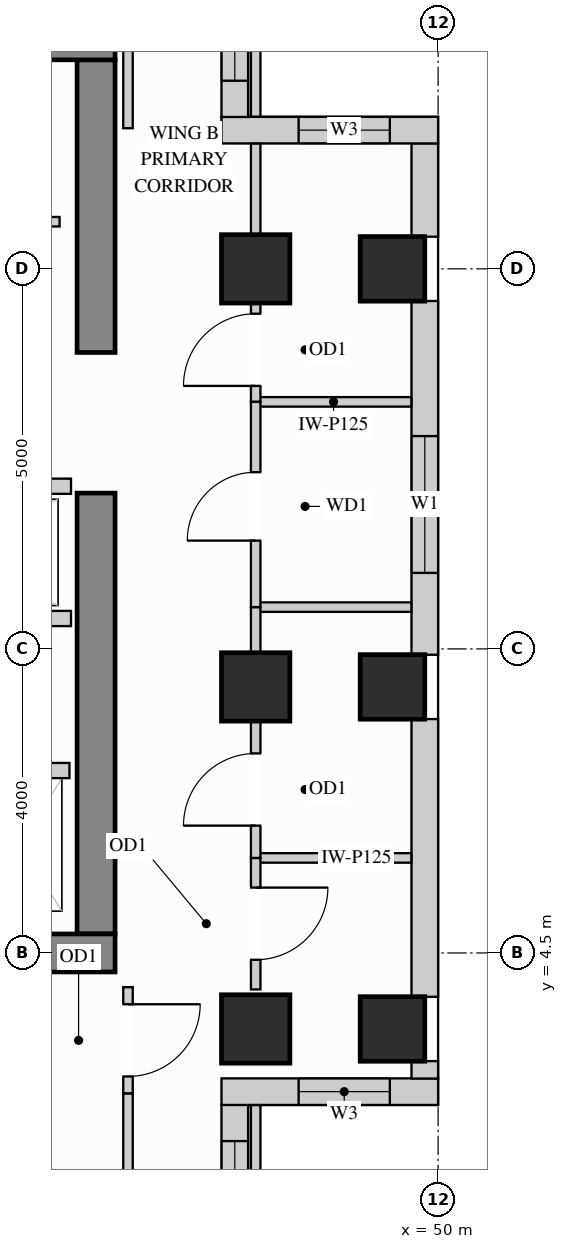
"""IFC4 building model, lengths in metres.
Left out: names, types, materials, properties, quantities, classifications, styles, units other than length and angle.
Written with IfcOpenShell. Run it as: python <this file> out.ifc"""

import sys

from ifc_helpers import new_model, si_unit, direction, frame, frame_2d, origin, origin_2d, place, context, subcontext, project, spatial, rectangle, extrude, source, transform, mapped, element, fill, save


model = new_model("IFC4")
c1 = context("Model", 3, precision=1e-05, world=origin(), true_north=direction((0.0, 1.0)))
c2 = subcontext(c1, "Body", "Model", "MODEL_VIEW")
j1 = project(units=[si_unit("LENGTHUNIT", "METRE"), si_unit("PLANEANGLEUNIT", "RADIAN")], contexts=[c1])
p1 = place(None, origin())
s1 = spatial("IfcSite", under=j1, at=p1, CompositionType="ELEMENT")
p2 = place(p1, origin())
s2 = spatial("IfcBuilding", under=s1, at=p2, CompositionType="ELEMENT")
p3 = place(p2, frame((0.0, 0.0, 216.0)))
s3 = spatial("IfcBuildingStorey", under=s2, at=p3, CompositionType="ELEMENT", Elevation=216.0)
m1 = source(origin(), c2, "Body", "SweptSolid", [
    extrude(rectangle(XDim=0.9, YDim=0.9, at=origin_2d()), origin(), (0.0, 0.0, 1.0), 3.4),
])
for number, where, z_axis, x_axis in (
    (1, (47.6, 13.5, 0.0), (0.0, 0.0, 1.0), (1.0, 0.0, 0.0)),
    (2, (47.6, 3.5, 0.0), (0.0, 0.0, 1.0), (1.0, 0.0, 0.0)),
    (3, (47.6, 8.0, 0.0), (0.0, 0.0, 1.0), (1.0, 0.0, 0.0)),
):
    element("IfcColumn", number, at=place(p3, frame(where, z_axis=z_axis, x_axis=x_axis)), inside=s3, PredefinedType="COLUMN", context=c2, shape_type="MappedRepresentation", body=[
        mapped(m1, transform((0.0, 0.0, 0.0), x_axis=(1.0, 0.0, 0.0), y_axis=(0.0, 1.0, 0.0), z_axis=(0.0, 0.0, 1.0))),
    ])
m2 = source(origin(), c2, "Body", "SweptSolid", [
    extrude(rectangle(XDim=0.85, YDim=0.85, at=origin_2d()), origin(), (0.0, 0.0, 1.0), 3.4),
])
for number, where, z_axis, x_axis in (
    (4, (49.4, 13.5, 0.0), (0.0, 0.0, 1.0), (1.0, 0.0, 0.0)),
    (5, (49.4, 3.5, 0.0), (0.0, 0.0, 1.0), (1.0, 0.0, 0.0)),
    (6, (49.4, 8.0, 0.0), (0.0, 0.0, 1.0), (1.0, 0.0, 0.0)),
):
    element("IfcColumn", number, at=place(p3, frame(where, z_axis=z_axis, x_axis=x_axis)), inside=s3, PredefinedType="COLUMN", context=c2, shape_type="MappedRepresentation", body=[
        mapped(m2, transform((0.0, 0.0, 0.0), x_axis=(1.0, 0.0, 0.0), y_axis=(0.0, 1.0, 0.0), z_axis=(0.0, 0.0, 1.0))),
    ])
m3 = source(origin(), c2, "Body", "SweptSolid", [
    extrude(rectangle(XDim=5.8, YDim=0.5, at=frame_2d((2.9, 0.0))), origin(), (0.0, 0.0, 1.0), 3.4),
])
p4 = place(p3, frame((45.5, 4.75, 0.0), z_axis=(0.0, 0.0, 1.0), x_axis=(0.0, 1.0, 0.0)))
e7 = element("IfcWall", 7, at=p4, inside=s3, PredefinedType="SHEAR", context=c2, shape_type="MappedRepresentation", body=[
    mapped(m3, transform((0.0, 0.0, 0.0), x_axis=(1.0, 0.0, 0.0), y_axis=(0.0, 1.0, 0.0), z_axis=(0.0, 0.0, 1.0))),
])
m4 = source(origin(), c2, "Body", "SweptSolid", [
    extrude(rectangle(XDim=3.85, YDim=0.5, at=frame_2d((1.925, 0.0))), origin(), (0.0, 0.0, 1.0), 3.4),
])
p5 = place(p3, frame((45.5, 12.4, 0.0), z_axis=(0.0, 0.0, 1.0), x_axis=(0.0, 1.0, 0.0)))
e8 = element("IfcWall", 8, at=p5, inside=s3, PredefinedType="SHEAR", context=c2, shape_type="MappedRepresentation", body=[
    mapped(m4, transform((0.0, 0.0, 0.0), x_axis=(1.0, 0.0, 0.0), y_axis=(0.0, 1.0, 0.0), z_axis=(0.0, 0.0, 1.0))),
])
m5 = source(origin(), c2, "Body", "SweptSolid", [
    extrude(rectangle(XDim=10.0, YDim=0.5, at=frame_2d((5.0, 0.0))), origin(), (0.0, 0.0, 1.0), 3.4),
])
for number, where, z_axis, x_axis in (
    (9, (35.75, 16.5, 0.0), (0.0, 0.0, 1.0), (1.0, 0.0, 0.0)),
    (10, (35.75, 4.5, 0.0), (0.0, 0.0, 1.0), (1.0, 0.0, 0.0)),
):
    element("IfcWall", number, at=place(p3, frame(where, z_axis=z_axis, x_axis=x_axis)), inside=s3, PredefinedType="SHEAR", context=c2, shape_type="MappedRepresentation", body=[
        mapped(m5, transform((0.0, 0.0, 0.0), x_axis=(1.0, 0.0, 0.0), y_axis=(0.0, 1.0, 0.0), z_axis=(0.0, 0.0, 1.0))),
    ])
p6 = place(p3, frame((47.325, 0.348, 0.0), z_axis=(0.0, 0.0, 1.0), x_axis=(0.0, 1.0, 0.0)))
e11 = element("IfcWall", 11, at=p6, inside=s3, PredefinedType="SOLIDWALL", context=c2, shape_type="SweptSolid", body=[
    extrude(rectangle(XDim=2.154, YDim=0.35, at=frame_2d((1.077, 0.0))), origin(), (0.0, 0.0, 1.0), 3.385),
])
p7 = place(p6, frame((0.477, 0.0, 0.78)))
e12 = element("IfcOpeningElement", 12, at=p7, cuts=e11, PredefinedType="OPENING", context=c2, shape_type="SweptSolid", body=[
    extrude(rectangle(XDim=1.2, YDim=2.1, at=frame_2d((0.6, 1.05))), frame((0.0, 0.185, 0.0), z_axis=(0.0, -1.0, 0.0), x_axis=(1.0, 0.0, 0.0)), (0.0, 0.0, 1.0), 0.37),
])
p8 = place(p3, frame((47.15, 2.675, 0.0), z_axis=(0.0, 0.0, 1.0), x_axis=(1.0, 0.0, 0.0)))
e13 = element("IfcWall", 13, at=p8, inside=s3, PredefinedType="SOLIDWALL", context=c2, shape_type="SweptSolid", body=[
    extrude(rectangle(XDim=2.85, YDim=0.35, at=frame_2d((1.425, 0.0))), origin(), (0.0, 0.0, 1.0), 3.385),
])
p9 = place(p8, frame((1.015, 0.0, 0.78)))
e14 = element("IfcOpeningElement", 14, at=p9, cuts=e13, PredefinedType="OPENING", context=c2, shape_type="SweptSolid", body=[
    extrude(rectangle(XDim=1.2, YDim=2.1, at=frame_2d((0.6, 1.05))), frame((0.0, 0.185, 0.0), z_axis=(0.0, -1.0, 0.0), x_axis=(1.0, 0.0, 0.0)), (0.0, 0.0, 1.0), 0.37),
])
m6 = source(origin(), c2, "Body", "SweptSolid", [
    extrude(rectangle(XDim=0.229, YDim=0.35, at=frame_2d((0.115, 0.0))), origin(), (0.0, 0.0, 1.0), 3.385),
])
p10 = place(p3, frame((49.825, 2.848, 0.0), z_axis=(0.0, 0.0, 1.0), x_axis=(0.0, 1.0, 0.0)))
e15 = element("IfcWall", 15, at=p10, inside=s3, PredefinedType="SOLIDWALL", context=c2, shape_type="MappedRepresentation", body=[
    mapped(m6, transform((0.0, 0.0, 0.0), x_axis=(1.0, 0.0, 0.0), y_axis=(0.0, 1.0, 0.0), z_axis=(0.0, 0.0, 1.0))),
])
m7 = source(origin(), c2, "Body", "SweptSolid", [
    extrude(rectangle(XDim=3.654, YDim=0.35, at=frame_2d((1.827, 0.0))), origin(), (0.0, 0.0, 1.0), 3.385),
])
p11 = place(p3, frame((49.825, 3.923, 0.0), z_axis=(0.0, 0.0, 1.0), x_axis=(0.0, 1.0, 0.0)))
e16 = element("IfcWall", 16, at=p11, inside=s3, PredefinedType="SOLIDWALL", context=c2, shape_type="MappedRepresentation", body=[
    mapped(m7, transform((0.0, 0.0, 0.0), x_axis=(1.0, 0.0, 0.0), y_axis=(0.0, 1.0, 0.0), z_axis=(0.0, 0.0, 1.0))),
])
p12 = place(p3, frame((49.825, 8.423, 0.0), z_axis=(0.0, 0.0, 1.0), x_axis=(0.0, 1.0, 0.0)))
e17 = element("IfcWall", 17, at=p12, inside=s3, PredefinedType="SOLIDWALL", context=c2, shape_type="SweptSolid", body=[
    extrude(rectangle(XDim=4.654, YDim=0.35, at=frame_2d((2.327, 0.0))), origin(), (0.0, 0.0, 1.0), 3.385),
])
p13 = place(p12, frame((1.077, 0.0, 0.78)))
e18 = element("IfcOpeningElement", 18, at=p13, cuts=e17, PredefinedType="OPENING", context=c2, shape_type="SweptSolid", body=[
    extrude(rectangle(XDim=1.8, YDim=2.1, at=frame_2d((0.9, 1.05))), frame((0.0, 0.185, 0.0), z_axis=(0.0, -1.0, 0.0), x_axis=(1.0, 0.0, 0.0)), (0.0, 0.0, 1.0), 0.37),
])
m8 = source(origin(), c2, "Body", "SweptSolid", [
    extrude(rectangle(XDim=1.229, YDim=0.35, at=frame_2d((0.615, 0.0))), origin(), (0.0, 0.0, 1.0), 3.385),
])
p14 = place(p3, frame((49.825, 13.923, 0.0), z_axis=(0.0, 0.0, 1.0), x_axis=(0.0, 1.0, 0.0)))
e19 = element("IfcWall", 19, at=p14, inside=s3, PredefinedType="SOLIDWALL", context=c2, shape_type="MappedRepresentation", body=[
    mapped(m8, transform((0.0, 0.0, 0.0), x_axis=(1.0, 0.0, 0.0), y_axis=(0.0, 1.0, 0.0), z_axis=(0.0, 0.0, 1.0))),
])
p15 = place(p3, frame((50.0, 15.325, 0.0), z_axis=(0.0, 0.0, 1.0), x_axis=(-1.0, 0.0, 0.0)))
e20 = element("IfcWall", 20, at=p15, inside=s3, PredefinedType="SOLIDWALL", context=c2, shape_type="SweptSolid", body=[
    extrude(rectangle(XDim=2.85, YDim=0.35, at=frame_2d((1.425, 0.0))), origin(), (0.0, 0.0, 1.0), 3.385),
])
p16 = place(p15, frame((0.635, 0.0, 0.78)))
e21 = element("IfcOpeningElement", 21, at=p16, cuts=e20, PredefinedType="OPENING", context=c2, shape_type="SweptSolid", body=[
    extrude(rectangle(XDim=1.2, YDim=2.1, at=frame_2d((0.6, 1.05))), frame((0.0, 0.185, 0.0), z_axis=(0.0, -1.0, 0.0), x_axis=(1.0, 0.0, 0.0)), (0.0, 0.0, 1.0), 0.37),
])
p17 = place(p3, frame((47.325, 15.498, 0.0), z_axis=(0.0, 0.0, 1.0), x_axis=(0.0, 1.0, 0.0)))
e22 = element("IfcWall", 22, at=p17, inside=s3, PredefinedType="SOLIDWALL", context=c2, shape_type="SweptSolid", body=[
    extrude(rectangle(XDim=2.154, YDim=0.35, at=frame_2d((1.077, 0.0))), origin(), (0.0, 0.0, 1.0), 3.385),
])
p18 = place(p17, frame((0.477, 0.0, 0.78)))
e23 = element("IfcOpeningElement", 23, at=p18, cuts=e22, PredefinedType="OPENING", context=c2, shape_type="SweptSolid", body=[
    extrude(rectangle(XDim=1.2, YDim=2.1, at=frame_2d((0.6, 1.05))), frame((0.0, 0.185, 0.0), z_axis=(0.0, -1.0, 0.0), x_axis=(1.0, 0.0, 0.0)), (0.0, 0.0, 1.0), 0.37),
])
p19 = place(p3, frame((40.75, 14.12, 0.0), z_axis=(0.0, 0.0, 1.0), x_axis=(1.0, 0.0, 0.0)))
e24 = element("IfcWall", 24, at=p19, inside=s3, PredefinedType="PARTITIONING", context=c2, shape_type="SweptSolid", body=[
    extrude(rectangle(XDim=4.27, YDim=0.125, at=frame_2d((2.135, 0.0))), origin(), (0.0, 0.0, 1.0), 3.385),
])
p20 = place(p19, frame((1.66, 0.0, 0.0)))
e25 = element("IfcOpeningElement", 25, at=p20, cuts=e24, PredefinedType="OPENING", context=c2, shape_type="SweptSolid", body=[
    extrude(rectangle(XDim=0.95, YDim=2.15, at=frame_2d((0.475, 1.075))), frame((0.0, 0.073, 0.0), z_axis=(0.0, -1.0, 0.0), x_axis=(1.0, 0.0, 0.0)), (0.0, 0.0, 1.0), 0.145),
])
m9 = source(origin(), c2, "Body", "SweptSolid", [
    extrude(rectangle(XDim=2.048, YDim=0.125, at=frame_2d((1.024, 0.0))), origin(), (0.0, 0.0, 1.0), 2.916),
])
p21 = place(p3, frame((47.6, 11.75, 0.0), z_axis=(0.0, 0.0, 1.0), x_axis=(1.0, 0.0, 0.0)))
e26 = element("IfcWall", 26, at=p21, inside=s3, PredefinedType="PARTITIONING", context=c2, shape_type="MappedRepresentation", body=[
    mapped(m9, transform((0.0, 0.0, 0.0), x_axis=(1.0, 0.0, 0.0), y_axis=(0.0, 1.0, 0.0), z_axis=(0.0, 0.0, 1.0))),
])
m10 = source(origin(), c2, "Body", "SweptSolid", [
    extrude(rectangle(XDim=2.048, YDim=0.125, at=frame_2d((1.024, 0.0))), origin(), (0.0, 0.0, 1.0), 3.385),
])
for number, where, z_axis, x_axis in (
    (27, (47.6, 5.75, 0.0), (0.0, 0.0, 1.0), (1.0, 0.0, 0.0)),
    (28, (47.6, 9.05, 0.0), (0.0, 0.0, 1.0), (1.0, 0.0, 0.0)),
):
    element("IfcWall", number, at=place(p3, frame(where, z_axis=z_axis, x_axis=x_axis)), inside=s3, PredefinedType="PARTITIONING", context=c2, shape_type="MappedRepresentation", body=[
        mapped(m10, transform((0.0, 0.0, 0.0), x_axis=(1.0, 0.0, 0.0), y_axis=(0.0, 1.0, 0.0), z_axis=(0.0, 0.0, 1.0))),
    ])
p22 = place(p3, frame((47.6, 4.02, 0.0), z_axis=(0.0, 0.0, 1.0), x_axis=(0.0, 1.0, 0.0)))
e29 = element("IfcWall", 29, at=p22, inside=s3, PredefinedType="PARTITIONING", context=c2, shape_type="SweptSolid", body=[
    extrude(rectangle(XDim=1.73, YDim=0.125, at=frame_2d((0.865, 0.0))), origin(), (0.0, 0.0, 1.0), 2.773),
])
p23 = place(p22, frame((0.39, 0.0, 0.0)))
e30 = element("IfcOpeningElement", 30, at=p23, cuts=e29, PredefinedType="OPENING", context=c2, shape_type="SweptSolid", body=[
    extrude(rectangle(XDim=0.95, YDim=2.15, at=frame_2d((0.475, 1.075))), frame((0.0, 0.073, 0.0), z_axis=(0.0, -1.0, 0.0), x_axis=(1.0, 0.0, 0.0)), (0.0, 0.0, 1.0), 0.145),
])
m11 = source(origin(), c2, "Body", "SweptSolid", [
    extrude(rectangle(XDim=2.148, YDim=0.125, at=frame_2d((1.074, 0.0))), origin(), (0.0, 0.0, 1.0), 3.385),
])
p24 = place(p3, frame((47.6, 0.35, 0.0), z_axis=(0.0, 0.0, 1.0), x_axis=(0.0, 1.0, 0.0)))
e31 = element("IfcWall", 31, at=p24, inside=s3, PredefinedType="PARTITIONING", context=c2, shape_type="MappedRepresentation", body=[
    mapped(m11, transform((0.0, 0.0, 0.0), x_axis=(1.0, 0.0, 0.0), y_axis=(0.0, 1.0, 0.0), z_axis=(0.0, 0.0, 1.0))),
])
p25 = place(p3, frame((47.6, 5.75, 0.0), z_axis=(0.0, 0.0, 1.0), x_axis=(0.0, 1.0, 0.0)))
e32 = element("IfcWall", 32, at=p25, inside=s3, PredefinedType="PARTITIONING", context=c2, shape_type="SweptSolid", body=[
    extrude(rectangle(XDim=1.8, YDim=0.125, at=frame_2d((0.9, 0.0))), origin(), (0.0, 0.0, 1.0), 2.773),
])
p26 = place(p25, frame((0.425, 0.0, 0.0)))
e33 = element("IfcOpeningElement", 33, at=p26, cuts=e32, PredefinedType="OPENING", context=c2, shape_type="SweptSolid", body=[
    extrude(rectangle(XDim=0.95, YDim=2.15, at=frame_2d((0.475, 1.075))), frame((0.0, 0.073, 0.0), z_axis=(0.0, -1.0, 0.0), x_axis=(1.0, 0.0, 0.0)), (0.0, 0.0, 1.0), 0.145),
])
m12 = source(origin(), c2, "Body", "SweptSolid", [
    extrude(rectangle(XDim=0.6, YDim=0.125, at=frame_2d((0.3, 0.0))), origin(), (0.0, 0.0, 1.0), 2.773),
])
p27 = place(p3, frame((47.6, 8.45, 0.0), z_axis=(0.0, 0.0, 1.0), x_axis=(0.0, 1.0, 0.0)))
e34 = element("IfcWall", 34, at=p27, inside=s3, PredefinedType="PARTITIONING", context=c2, shape_type="MappedRepresentation", body=[
    mapped(m12, transform((0.0, 0.0, 0.0), x_axis=(1.0, 0.0, 0.0), y_axis=(0.0, 1.0, 0.0), z_axis=(0.0, 0.0, 1.0))),
])
p28 = place(p3, frame((47.6, 11.75, 0.0), z_axis=(0.0, 0.0, 1.0), x_axis=(0.0, 1.0, 0.0)))
e35 = element("IfcWall", 35, at=p28, inside=s3, PredefinedType="PARTITIONING", context=c2, shape_type="SweptSolid", body=[
    extrude(rectangle(XDim=1.3, YDim=0.125, at=frame_2d((0.65, 0.0))), origin(), (0.0, 0.0, 1.0), 2.773),
])
p29 = place(p28, frame((0.21, 0.0, 0.0)))
e36 = element("IfcOpeningElement", 36, at=p29, cuts=e35, PredefinedType="OPENING", context=c2, shape_type="SweptSolid", body=[
    extrude(rectangle(XDim=0.95, YDim=2.15, at=frame_2d((0.475, 1.075))), frame((0.0, 0.073, 0.0), z_axis=(0.0, -1.0, 0.0), x_axis=(1.0, 0.0, 0.0)), (0.0, 0.0, 1.0), 0.145),
])
m13 = source(origin(), c2, "Body", "SweptSolid", [
    extrude(rectangle(XDim=1.198, YDim=0.125, at=frame_2d((0.599, 0.0))), origin(), (0.0, 0.0, 1.0), 3.385),
])
p30 = place(p3, frame((47.6, 13.95, 0.0), z_axis=(0.0, 0.0, 1.0), x_axis=(0.0, 1.0, 0.0)))
e37 = element("IfcWall", 37, at=p30, inside=s3, PredefinedType="PARTITIONING", context=c2, shape_type="MappedRepresentation", body=[
    mapped(m13, transform((0.0, 0.0, 0.0), x_axis=(1.0, 0.0, 0.0), y_axis=(0.0, 1.0, 0.0), z_axis=(0.0, 0.0, 1.0))),
])
p31 = place(p3, frame((47.6, 15.502, 0.0), z_axis=(0.0, 0.0, 1.0), x_axis=(0.0, 1.0, 0.0)))
e38 = element("IfcWall", 38, at=p31, inside=s3, PredefinedType="PARTITIONING", context=c2, shape_type="MappedRepresentation", body=[
    mapped(m11, transform((0.0, 0.0, 0.0), x_axis=(1.0, 0.0, 0.0), y_axis=(0.0, 1.0, 0.0), z_axis=(0.0, 0.0, 1.0))),
])
p32 = place(p3, frame((47.6, 9.05, 0.0), z_axis=(0.0, 0.0, 1.0), x_axis=(0.0, 1.0, 0.0)))
e39 = element("IfcWall", 39, at=p32, inside=s3, PredefinedType="PARTITIONING", context=c2, shape_type="SweptSolid", body=[
    extrude(rectangle(XDim=2.7, YDim=0.125, at=frame_2d((1.35, 0.0))), origin(), (0.0, 0.0, 1.0), 2.773),
])
p33 = place(p32, frame((0.875, 0.0, 0.0)))
e40 = element("IfcOpeningElement", 40, at=p33, cuts=e39, PredefinedType="OPENING", context=c2, shape_type="SweptSolid", body=[
    extrude(rectangle(XDim=0.9, YDim=2.15, at=frame_2d((0.45, 1.075))), frame((0.0, 0.073, 0.0), z_axis=(0.0, -1.0, 0.0), x_axis=(1.0, 0.0, 0.0)), (0.0, 0.0, 1.0), 0.145),
])
m14 = source(origin(), c2, "Body", "SweptSolid", [
    extrude(rectangle(XDim=2.298, YDim=0.125, at=frame_2d((1.149, 0.0))), origin(), (0.0, 0.0, 1.0), 3.385),
])
p34 = place(p3, frame((45.92, 15.35, 0.0), z_axis=(0.0, 0.0, 1.0), x_axis=(0.0, 1.0, 0.0)))
e41 = element("IfcWall", 41, at=p34, inside=s3, PredefinedType="PARTITIONING", context=c2, shape_type="MappedRepresentation", body=[
    mapped(m14, transform((0.0, 0.0, 0.0), x_axis=(1.0, 0.0, 0.0), y_axis=(0.0, 1.0, 0.0), z_axis=(0.0, 0.0, 1.0))),
])
p35 = place(p3, frame((45.92, 2.65, 0.0), z_axis=(0.0, 0.0, 1.0), x_axis=(0.0, 1.0, 0.0)))
e42 = element("IfcWall", 42, at=p35, inside=s3, PredefinedType="PARTITIONING", context=c2, shape_type="SweptSolid", body=[
    extrude(rectangle(XDim=1.4, YDim=0.125, at=frame_2d((0.7, 0.0))), origin(), (0.0, 0.0, 1.0), 3.385),
])
p36 = place(p35, frame((0.225, 0.0, 0.0)))
e43 = element("IfcOpeningElement", 43, at=p36, cuts=e42, PredefinedType="OPENING", context=c2, shape_type="SweptSolid", body=[
    extrude(rectangle(XDim=0.95, YDim=2.15, at=frame_2d((0.475, 1.075))), frame((0.0, 0.073, 0.0), z_axis=(0.0, -1.0, 0.0), x_axis=(1.0, 0.0, 0.0)), (0.0, 0.0, 1.0), 0.145),
])
p37 = place(p3, frame((45.92, 0.352, 0.0), z_axis=(0.0, 0.0, 1.0), x_axis=(0.0, 1.0, 0.0)))
e44 = element("IfcWall", 44, at=p37, inside=s3, PredefinedType="PARTITIONING", context=c2, shape_type="MappedRepresentation", body=[
    mapped(m14, transform((0.0, 0.0, 0.0), x_axis=(1.0, 0.0, 0.0), y_axis=(0.0, 1.0, 0.0), z_axis=(0.0, 0.0, 1.0))),
])
m15 = source(origin(), c2, "Body", "SweptSolid", [
    extrude(rectangle(XDim=1.3, YDim=0.2, at=frame_2d((0.65, 0.0))), origin(), (0.0, 0.0, 1.0), 3.385),
])
p38 = place(p3, frame((43.85, 6.9, 0.0), z_axis=(0.0, 0.0, 1.0), x_axis=(1.0, 0.0, 0.0)))
e45 = element("IfcWall", 45, at=p38, inside=s3, PredefinedType="PARTITIONING", context=c2, shape_type="MappedRepresentation", body=[
    mapped(m15, transform((0.0, 0.0, 0.0), x_axis=(1.0, 0.0, 0.0), y_axis=(0.0, 1.0, 0.0), z_axis=(0.0, 0.0, 1.0))),
])
m16 = source(origin(), c2, "Body", "SweptSolid", [
    extrude(rectangle(XDim=3.49, YDim=0.2, at=frame_2d((1.745, 0.0))), origin(), (0.0, 0.0, 1.0), 3.385),
])
for number, where, z_axis, x_axis in (
    (46, (41.68, 10.64, 0.0), (0.0, 0.0, 1.0), (1.0, 0.0, 0.0)),
    (47, (41.68, 8.9, 0.0), (0.0, 0.0, 1.0), (1.0, 0.0, 0.0)),
):
    element("IfcWall", number, at=place(p3, frame(where, z_axis=z_axis, x_axis=x_axis)), inside=s3, PredefinedType="PARTITIONING", context=c2, shape_type="MappedRepresentation", body=[
        mapped(m16, transform((0.0, 0.0, 0.0), x_axis=(1.0, 0.0, 0.0), y_axis=(0.0, 1.0, 0.0), z_axis=(0.0, 0.0, 1.0))),
    ])
m17 = source(origin(), c2, "Body", "SweptSolid", [
    extrude(rectangle(XDim=0.95, YDim=2.15, at=frame_2d((0.475, 1.075))), frame((0.0, 0.025, 0.0), z_axis=(0.0, -1.0, 0.0), x_axis=(1.0, 0.0, 0.0)), (0.0, 0.0, 1.0), 0.05),
])
p39 = place(p36, origin())
e48 = element("IfcDoor", 48, at=p39, inside=s3, OperationType="SINGLE_SWING_RIGHT", PredefinedType="DOOR", context=c2, shape_type="MappedRepresentation", body=[
    mapped(m17, transform((0.0, 0.0, 0.0), x_axis=(1.0, 0.0, 0.0), y_axis=(0.0, 1.0, 0.0), z_axis=(0.0, 0.0, 1.0))),
])
fill(e43, e48)
p40 = place(p23, origin())
e49 = element("IfcDoor", 49, at=p40, inside=s3, OperationType="SINGLE_SWING_RIGHT", PredefinedType="DOOR", context=c2, shape_type="MappedRepresentation", body=[
    mapped(m17, transform((0.0, 0.0, 0.0), x_axis=(1.0, 0.0, 0.0), y_axis=(0.0, 1.0, 0.0), z_axis=(0.0, 0.0, 1.0))),
])
fill(e30, e49)
p41 = place(p26, origin())
e50 = element("IfcDoor", 50, at=p41, inside=s3, OperationType="SINGLE_SWING_LEFT", PredefinedType="DOOR", context=c2, shape_type="MappedRepresentation", body=[
    mapped(m17, transform((0.0, 0.0, 0.0), x_axis=(1.0, 0.0, 0.0), y_axis=(0.0, 1.0, 0.0), z_axis=(0.0, 0.0, 1.0))),
])
fill(e33, e50)
p42 = place(p29, origin())
e51 = element("IfcDoor", 51, at=p42, inside=s3, OperationType="SINGLE_SWING_LEFT", PredefinedType="DOOR", context=c2, shape_type="MappedRepresentation", body=[
    mapped(m17, transform((0.0, 0.0, 0.0), x_axis=(1.0, 0.0, 0.0), y_axis=(0.0, 1.0, 0.0), z_axis=(0.0, 0.0, 1.0))),
])
fill(e36, e51)
m18 = source(origin(), c2, "Body", "SweptSolid", [
    extrude(rectangle(XDim=0.9, YDim=2.15, at=frame_2d((0.45, 1.075))), frame((0.0, 0.025, 0.0), z_axis=(0.0, -1.0, 0.0), x_axis=(1.0, 0.0, 0.0)), (0.0, 0.0, 1.0), 0.05),
])
p43 = place(p33, origin())
e52 = element("IfcDoor", 52, at=p43, inside=s3, OperationType="SINGLE_SWING_LEFT", PredefinedType="DOOR", context=c2, shape_type="MappedRepresentation", body=[
    mapped(m18, transform((0.0, 0.0, 0.0), x_axis=(1.0, 0.0, 0.0), y_axis=(0.0, 1.0, 0.0), z_axis=(0.0, 0.0, 1.0))),
])
fill(e40, e52)
m19 = source(origin(), c2, "Body", "SweptSolid", [
    extrude(rectangle(XDim=1.8, YDim=2.1, at=frame_2d((0.9, 1.05))), frame((0.0, 0.03, 0.0), z_axis=(0.0, -1.0, 0.0), x_axis=(1.0, 0.0, 0.0)), (0.0, 0.0, 1.0), 0.06),
])
p44 = place(p13, origin())
e53 = element("IfcWindow", 53, at=p44, inside=s3, PartitioningType="SINGLE_PANEL", PredefinedType="WINDOW", context=c2, shape_type="MappedRepresentation", body=[
    mapped(m19, transform((0.0, 0.0, 0.0), x_axis=(1.0, 0.0, 0.0), y_axis=(0.0, 1.0, 0.0), z_axis=(0.0, 0.0, 1.0))),
])
fill(e18, e53)
m20 = source(origin(), c2, "Body", "SweptSolid", [
    extrude(rectangle(XDim=1.2, YDim=2.1, at=frame_2d((0.6, 1.05))), frame((0.0, 0.03, 0.0), z_axis=(0.0, -1.0, 0.0), x_axis=(1.0, 0.0, 0.0)), (0.0, 0.0, 1.0), 0.06),
])
p45 = place(p7, origin())
e54 = element("IfcWindow", 54, at=p45, inside=s3, PartitioningType="SINGLE_PANEL", PredefinedType="WINDOW", context=c2, shape_type="MappedRepresentation", body=[
    mapped(m20, transform((0.0, 0.0, 0.0), x_axis=(1.0, 0.0, 0.0), y_axis=(0.0, 1.0, 0.0), z_axis=(0.0, 0.0, 1.0))),
])
fill(e12, e54)
p46 = place(p9, origin())
e55 = element("IfcWindow", 55, at=p46, inside=s3, PartitioningType="SINGLE_PANEL", PredefinedType="WINDOW", context=c2, shape_type="MappedRepresentation", body=[
    mapped(m20, transform((0.0, 0.0, 0.0), x_axis=(1.0, 0.0, 0.0), y_axis=(0.0, 1.0, 0.0), z_axis=(0.0, 0.0, 1.0))),
])
fill(e14, e55)
p47 = place(p16, origin())
e56 = element("IfcWindow", 56, at=p47, inside=s3, PartitioningType="SINGLE_PANEL", PredefinedType="WINDOW", context=c2, shape_type="MappedRepresentation", body=[
    mapped(m20, transform((0.0, 0.0, 0.0), x_axis=(1.0, 0.0, 0.0), y_axis=(0.0, 1.0, 0.0), z_axis=(0.0, 0.0, 1.0))),
])
fill(e21, e56)
p48 = place(p18, origin())
e57 = element("IfcWindow", 57, at=p48, inside=s3, PartitioningType="SINGLE_PANEL", PredefinedType="WINDOW", context=c2, shape_type="MappedRepresentation", body=[
    mapped(m20, transform((0.0, 0.0, 0.0), x_axis=(1.0, 0.0, 0.0), y_axis=(0.0, 1.0, 0.0), z_axis=(0.0, 0.0, 1.0))),
])
fill(e23, e57)
save(model, sys.argv[1])
